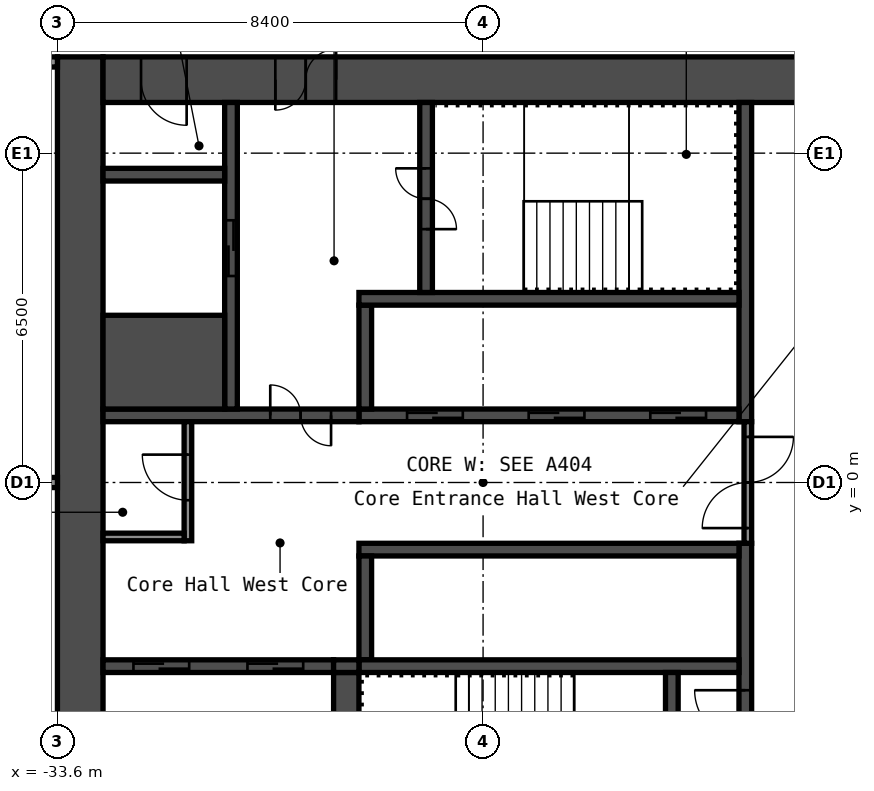
"""IFC4 building model, lengths in metres.
Left out: names, types, materials, properties, quantities, classifications, styles, units other than length and angle.
Written with IfcOpenShell. Run it as: python <this file> out.ifc"""

import sys

from ifc_helpers import new_model, si_unit, direction, frame, frame_2d, origin, place, context, subcontext, project, spatial, rectangle, extrude, element, fill, save


model = new_model("IFC4")
c1 = context("Model", 3, precision=1e-05, world=origin(), true_north=direction((0.0, 1.0)))
c2 = subcontext(c1, "Body", "Model", "MODEL_VIEW")
j1 = project(units=[si_unit("LENGTHUNIT", "METRE"), si_unit("PLANEANGLEUNIT", "RADIAN")], contexts=[c1])
p1 = place(None, origin())
s1 = spatial("IfcSite", under=j1, at=p1, CompositionType="ELEMENT")
p2 = place(p1, origin())
s2 = spatial("IfcBuilding", under=s1, at=p2, CompositionType="ELEMENT")
p3 = place(p2, frame((0.0, 0.0, 19.8)))
s3 = spatial("IfcBuildingStorey", under=s2, at=p3, CompositionType="ELEMENT", Elevation=19.8)
p4 = place(p3, frame((-33.15, -8.4, 0.0), z_axis=(0.0, 0.0, 1.0), x_axis=(0.0, 1.0, 0.0)))
e1 = element("IfcWall", 1, at=p4, inside=s3, PredefinedType="SHEAR", context=c2, shape_type="SweptSolid", body=[
    extrude(rectangle(XDim=16.8, YDim=0.9, at=frame_2d((8.4, 0.0))), origin(), (0.0, 0.0, 1.0), 2.8),
])
p5 = place(p3, frame((-32.7, 7.95, 0.0), z_axis=(0.0, 0.0, 1.0), x_axis=(1.0, 0.0, 0.0)))
e2 = element("IfcWall", 2, at=p5, inside=s3, PredefinedType="SHEAR", context=c2, shape_type="SweptSolid", body=[
    extrude(rectangle(XDim=15.0, YDim=0.9, at=frame_2d((7.5, 0.0))), origin(), (0.0, 0.0, 1.0), 2.8),
])
p6 = place(p5, frame((3.4, 0.0, 0.0)))
e3 = element("IfcOpeningElement", 3, at=p6, cuts=e2, PredefinedType="OPENING", context=c2, shape_type="SweptSolid", body=[
    extrude(rectangle(XDim=1.2, YDim=2.1, at=frame_2d((0.6, 1.05))), frame((0.0, 0.46, 0.0), z_axis=(0.0, -1.0, 0.0), x_axis=(1.0, 0.0, 0.0)), (0.0, 0.0, 1.0), 0.92),
])
p7 = place(p5, frame((0.75, 0.0, 0.0)))
e4 = element("IfcOpeningElement", 4, at=p7, cuts=e2, PredefinedType="OPENING", context=c2, shape_type="SweptSolid", body=[
    extrude(rectangle(XDim=0.9, YDim=2.1, at=frame_2d((0.45, 1.05))), frame((0.0, 0.46, 0.0), z_axis=(0.0, -1.0, 0.0), x_axis=(1.0, 0.0, 0.0)), (0.0, 0.0, 1.0), 0.92),
])
p8 = place(p3, frame((-20.025, 1.2, 0.0), z_axis=(0.0, 0.0, 1.0), x_axis=(0.0, 1.0, 0.0)))
e5 = element("IfcWall", 5, at=p8, inside=s3, PredefinedType="SHEAR", context=c2, shape_type="SweptSolid", body=[
    extrude(rectangle(XDim=6.3, YDim=0.25, at=frame_2d((3.15, 0.0))), origin(), (0.0, 0.0, 1.0), 2.8),
])
p9 = place(p3, frame((-20.025, -7.5, 0.0), z_axis=(0.0, 0.0, 1.0), x_axis=(0.0, 1.0, 0.0)))
e6 = element("IfcWall", 6, at=p9, inside=s3, PredefinedType="SHEAR", context=c2, shape_type="SweptSolid", body=[
    extrude(rectangle(XDim=6.3, YDim=0.25, at=frame_2d((3.15, 0.0))), origin(), (0.0, 0.0, 1.0), 2.8),
])
p10 = place(p9, frame((2.4, 0.0, 0.0)))
e7 = element("IfcOpeningElement", 7, at=p10, cuts=e6, PredefinedType="OPENING", context=c2, shape_type="SweptSolid", body=[
    extrude(rectangle(XDim=1.0, YDim=2.1, at=frame_2d((0.5, 1.05))), frame((0.0, 0.135, 0.0), z_axis=(0.0, -1.0, 0.0), x_axis=(1.0, 0.0, 0.0)), (0.0, 0.0, 1.0), 0.27),
])
p11 = place(p3, frame((-27.65, 1.325, 0.0), z_axis=(0.0, 0.0, 1.0), x_axis=(1.0, 0.0, 0.0)))
e8 = element("IfcWall", 8, at=p11, inside=s3, PredefinedType="SHEAR", context=c2, shape_type="SweptSolid", body=[
    extrude(rectangle(XDim=7.5, YDim=0.25, at=frame_2d((3.75, 0.0))), origin(), (0.0, 0.0, 1.0), 2.8),
])
p12 = place(p11, frame((5.75, 0.0, 0.0)))
e9 = element("IfcOpeningElement", 9, at=p12, cuts=e8, PredefinedType="OPENING", context=c2, shape_type="SweptSolid", body=[
    extrude(rectangle(XDim=1.1, YDim=2.1, at=frame_2d((0.55, 1.05))), frame((0.0, 0.135, 0.0), z_axis=(0.0, -1.0, 0.0), x_axis=(1.0, 0.0, 0.0)), (0.0, 0.0, 1.0), 0.27),
])
p13 = place(p11, frame((3.35, 0.0, 0.0)))
e10 = element("IfcOpeningElement", 10, at=p13, cuts=e8, PredefinedType="OPENING", context=c2, shape_type="SweptSolid", body=[
    extrude(rectangle(XDim=1.1, YDim=2.1, at=frame_2d((0.55, 1.05))), frame((0.0, 0.135, 0.0), z_axis=(0.0, -1.0, 0.0), x_axis=(1.0, 0.0, 0.0)), (0.0, 0.0, 1.0), 0.27),
])
p14 = place(p11, frame((0.95, 0.0, 0.0)))
e11 = element("IfcOpeningElement", 11, at=p14, cuts=e8, PredefinedType="OPENING", context=c2, shape_type="SweptSolid", body=[
    extrude(rectangle(XDim=1.1, YDim=2.1, at=frame_2d((0.55, 1.05))), frame((0.0, 0.135, 0.0), z_axis=(0.0, -1.0, 0.0), x_axis=(1.0, 0.0, 0.0)), (0.0, 0.0, 1.0), 0.27),
])
p15 = place(p3, frame((-27.525, 1.45, 0.0), z_axis=(0.0, 0.0, 1.0), x_axis=(0.0, 1.0, 0.0)))
e12 = element("IfcWall", 12, at=p15, inside=s3, PredefinedType="SHEAR", context=c2, shape_type="SweptSolid", body=[
    extrude(rectangle(XDim=2.05, YDim=0.25, at=frame_2d((1.025, 0.0))), origin(), (0.0, 0.0, 1.0), 2.8),
])
p16 = place(p3, frame((-27.65, 3.625, 0.0), z_axis=(0.0, 0.0, 1.0), x_axis=(1.0, 0.0, 0.0)))
e13 = element("IfcWall", 13, at=p16, inside=s3, PredefinedType="SHEAR", context=c2, shape_type="SweptSolid", body=[
    extrude(rectangle(XDim=7.5, YDim=0.25, at=frame_2d((3.75, 0.0))), origin(), (0.0, 0.0, 1.0), 2.8),
])
p17 = place(p3, frame((-26.325, 3.75, 0.0), z_axis=(0.0, 0.0, 1.0), x_axis=(0.0, 1.0, 0.0)))
e14 = element("IfcWall", 14, at=p17, inside=s3, PredefinedType="SHEAR", context=c2, shape_type="SweptSolid", body=[
    extrude(rectangle(XDim=3.75, YDim=0.25, at=frame_2d((1.875, 0.0))), origin(), (0.0, 0.0, 1.0), 2.8),
])
p18 = place(p17, frame((1.25, 0.0, 0.0)))
e15 = element("IfcOpeningElement", 15, at=p18, cuts=e14, PredefinedType="OPENING", context=c2, shape_type="SweptSolid", body=[
    extrude(rectangle(XDim=1.2, YDim=2.1, at=frame_2d((0.6, 1.05))), frame((0.0, 0.135, 0.0), z_axis=(0.0, -1.0, 0.0), x_axis=(1.0, 0.0, 0.0)), (0.0, 0.0, 1.0), 0.27),
])
p19 = place(p3, frame((-32.7, 1.325, 0.0), z_axis=(0.0, 0.0, 1.0), x_axis=(1.0, 0.0, 0.0)))
e16 = element("IfcWall", 16, at=p19, inside=s3, PredefinedType="SHEAR", context=c2, shape_type="SweptSolid", body=[
    extrude(rectangle(XDim=5.05, YDim=0.25, at=frame_2d((2.525, 0.0))), origin(), (0.0, 0.0, 1.0), 2.8),
])
p20 = place(p19, frame((3.3, 0.0, 0.0)))
e17 = element("IfcOpeningElement", 17, at=p20, cuts=e16, PredefinedType="OPENING", context=c2, shape_type="SweptSolid", body=[
    extrude(rectangle(XDim=1.2, YDim=2.1, at=frame_2d((0.6, 1.05))), frame((0.0, 0.135, 0.0), z_axis=(0.0, -1.0, 0.0), x_axis=(1.0, 0.0, 0.0)), (0.0, 0.0, 1.0), 0.27),
])
p21 = place(p3, frame((-30.175, 1.45, 0.0), z_axis=(0.0, 0.0, 1.0), x_axis=(0.0, 1.0, 0.0)))
e18 = element("IfcWall", 18, at=p21, inside=s3, PredefinedType="SHEAR", context=c2, shape_type="SweptSolid", body=[
    extrude(rectangle(XDim=6.05, YDim=0.25, at=frame_2d((3.025, 0.0))), origin(), (0.0, 0.0, 1.0), 2.8),
])
p22 = place(p21, frame((2.625, 0.0, 0.0)))
e19 = element("IfcOpeningElement", 19, at=p22, cuts=e18, PredefinedType="OPENING", context=c2, shape_type="SweptSolid", body=[
    extrude(rectangle(XDim=1.1, YDim=2.1, at=frame_2d((0.55, 1.05))), frame((0.0, 0.135, 0.0), z_axis=(0.0, -1.0, 0.0), x_axis=(1.0, 0.0, 0.0)), (0.0, 0.0, 1.0), 0.27),
])
p23 = place(p3, frame((-32.7, 2.375, 0.0), z_axis=(0.0, 0.0, 1.0), x_axis=(1.0, 0.0, 0.0)))
e20 = element("IfcWall", 20, at=p23, inside=s3, PredefinedType="SHEAR", context=c2, shape_type="SweptSolid", body=[
    extrude(rectangle(XDim=2.4, YDim=1.85, at=frame_2d((1.2, 0.0))), origin(), (0.0, 0.0, 1.0), 2.8),
])
p24 = place(p3, frame((-32.7, 6.075, 0.0), z_axis=(0.0, 0.0, 1.0), x_axis=(1.0, 0.0, 0.0)))
e21 = element("IfcWall", 21, at=p24, inside=s3, PredefinedType="SHEAR", context=c2, shape_type="SweptSolid", body=[
    extrude(rectangle(XDim=2.4, YDim=0.25, at=frame_2d((1.2, 0.0))), origin(), (0.0, 0.0, 1.0), 2.8),
])
p25 = place(p3, frame((-27.65, -1.325, 0.0), z_axis=(0.0, 0.0, 1.0), x_axis=(1.0, 0.0, 0.0)))
e22 = element("IfcWall", 22, at=p25, inside=s3, PredefinedType="SHEAR", context=c2, shape_type="SweptSolid", body=[
    extrude(rectangle(XDim=7.5, YDim=0.25, at=frame_2d((3.75, 0.0))), origin(), (0.0, 0.0, 1.0), 2.8),
])
p26 = place(p3, frame((-27.525, -3.5, 0.0), z_axis=(0.0, 0.0, 1.0), x_axis=(0.0, 1.0, 0.0)))
e23 = element("IfcWall", 23, at=p26, inside=s3, PredefinedType="SHEAR", context=c2, shape_type="SweptSolid", body=[
    extrude(rectangle(XDim=2.05, YDim=0.25, at=frame_2d((1.025, 0.0))), origin(), (0.0, 0.0, 1.0), 2.8),
])
p27 = place(p3, frame((-27.65, -3.625, 0.0), z_axis=(0.0, 0.0, 1.0), x_axis=(1.0, 0.0, 0.0)))
e24 = element("IfcWall", 24, at=p27, inside=s3, PredefinedType="SHEAR", context=c2, shape_type="SweptSolid", body=[
    extrude(rectangle(XDim=7.5, YDim=0.25, at=frame_2d((3.75, 0.0))), origin(), (0.0, 0.0, 1.0), 2.8),
])
p28 = place(p3, frame((-21.475, -7.5, 0.0), z_axis=(0.0, 0.0, 1.0), x_axis=(0.0, 1.0, 0.0)))
e25 = element("IfcWall", 25, at=p28, inside=s3, PredefinedType="SHEAR", context=c2, shape_type="SweptSolid", body=[
    extrude(rectangle(XDim=3.75, YDim=0.25, at=frame_2d((1.875, 0.0))), origin(), (0.0, 0.0, 1.0), 2.8),
])
p29 = place(p28, frame((1.3, 0.0, 0.0)))
e26 = element("IfcOpeningElement", 26, at=p29, cuts=e25, PredefinedType="OPENING", context=c2, shape_type="SweptSolid", body=[
    extrude(rectangle(XDim=1.2, YDim=2.1, at=frame_2d((0.6, 1.05))), frame((0.0, 0.135, 0.0), z_axis=(0.0, -1.0, 0.0), x_axis=(1.0, 0.0, 0.0)), (0.0, 0.0, 1.0), 0.27),
])
p30 = place(p3, frame((-27.9, -7.5, 0.0), z_axis=(0.0, 0.0, 1.0), x_axis=(0.0, 1.0, 0.0)))
e27 = element("IfcWall", 27, at=p30, inside=s3, PredefinedType="SHEAR", context=c2, shape_type="SweptSolid", body=[
    extrude(rectangle(XDim=3.75, YDim=0.5, at=frame_2d((1.875, 0.0))), origin(), (0.0, 0.0, 1.0), 2.8),
])
p31 = place(p3, frame((-32.7, -3.625, 0.0), z_axis=(0.0, 0.0, 1.0), x_axis=(1.0, 0.0, 0.0)))
e28 = element("IfcWall", 28, at=p31, inside=s3, PredefinedType="SHEAR", context=c2, shape_type="SweptSolid", body=[
    extrude(rectangle(XDim=4.55, YDim=0.25, at=frame_2d((2.275, 0.0))), origin(), (0.0, 0.0, 1.0), 2.8),
])
p32 = place(p31, frame((2.85, 0.0, 0.0)))
e29 = element("IfcOpeningElement", 29, at=p32, cuts=e28, PredefinedType="OPENING", context=c2, shape_type="SweptSolid", body=[
    extrude(rectangle(XDim=1.1, YDim=2.1, at=frame_2d((0.55, 1.05))), frame((0.0, 0.135, 0.0), z_axis=(0.0, -1.0, 0.0), x_axis=(1.0, 0.0, 0.0)), (0.0, 0.0, 1.0), 0.27),
])
p33 = place(p31, frame((0.6, 0.0, 0.0)))
e30 = element("IfcOpeningElement", 30, at=p33, cuts=e28, PredefinedType="OPENING", context=c2, shape_type="SweptSolid", body=[
    extrude(rectangle(XDim=1.1, YDim=2.1, at=frame_2d((0.55, 1.05))), frame((0.0, 0.135, 0.0), z_axis=(0.0, -1.0, 0.0), x_axis=(1.0, 0.0, 0.0)), (0.0, 0.0, 1.0), 0.27),
])
p34 = place(p3, frame((-28.15, -3.625, 0.0), z_axis=(0.0, 0.0, 1.0), x_axis=(1.0, 0.0, 0.0)))
e31 = element("IfcWall", 31, at=p34, inside=s3, PredefinedType="SHEAR", context=c2, shape_type="SweptSolid", body=[
    extrude(rectangle(XDim=0.5, YDim=0.25, at=frame_2d((0.25, 0.0))), origin(), (0.0, 0.0, 1.0), 2.8),
])
p35 = place(p3, frame((-19.975, -1.2, 0.0), z_axis=(0.0, 0.0, 1.0), x_axis=(0.0, 1.0, 0.0)))
e32 = element("IfcWall", 32, at=p35, inside=s3, PredefinedType="PARTITIONING", context=c2, shape_type="SweptSolid", body=[
    extrude(rectangle(XDim=2.4, YDim=0.15, at=frame_2d((1.2, 0.0))), origin(), (0.0, 0.0, 1.0), 2.8),
])
p36 = place(p35, frame((0.3, 0.0, 0.0)))
e33 = element("IfcOpeningElement", 33, at=p36, cuts=e32, PredefinedType="OPENING", context=c2, shape_type="SweptSolid", body=[
    extrude(rectangle(XDim=1.8, YDim=2.1, at=frame_2d((0.9, 1.05))), frame((0.0, 0.085, 0.0), z_axis=(0.0, -1.0, 0.0), x_axis=(1.0, 0.0, 0.0)), (0.0, 0.0, 1.0), 0.17),
])
p37 = place(p3, frame((-31.025, -1.15, 0.0), z_axis=(0.0, 0.0, 1.0), x_axis=(0.0, 1.0, 0.0)))
e34 = element("IfcWall", 34, at=p37, inside=s3, PredefinedType="PARTITIONING", context=c2, shape_type="SweptSolid", body=[
    extrude(rectangle(XDim=2.35, YDim=0.15, at=frame_2d((1.175, 0.0))), origin(), (0.0, 0.0, 1.0), 2.8),
])
p38 = place(p37, frame((0.8, 0.0, 0.0)))
e35 = element("IfcOpeningElement", 35, at=p38, cuts=e34, PredefinedType="OPENING", context=c2, shape_type="SweptSolid", body=[
    extrude(rectangle(XDim=0.9, YDim=2.1, at=frame_2d((0.45, 1.05))), frame((0.0, 0.085, 0.0), z_axis=(0.0, -1.0, 0.0), x_axis=(1.0, 0.0, 0.0)), (0.0, 0.0, 1.0), 0.17),
])
p39 = place(p3, frame((-32.7, -1.075, 0.0), z_axis=(0.0, 0.0, 1.0), x_axis=(1.0, 0.0, 0.0)))
e36 = element("IfcWall", 36, at=p39, inside=s3, PredefinedType="PARTITIONING", context=c2, shape_type="SweptSolid", body=[
    extrude(rectangle(XDim=1.6, YDim=0.15, at=frame_2d((0.8, 0.0))), origin(), (0.0, 0.0, 1.0), 2.8),
])
p40 = place(p3, frame((-48.5, 0.0, 0.0), z_axis=(0.0, 0.0, 1.0), x_axis=(1.0, 0.0, 0.0)))
e37 = element("IfcWall", 37, at=p40, inside=s3, PredefinedType="PARTITIONING", context=c2, shape_type="SweptSolid", body=[
    extrude(rectangle(XDim=14.9, YDim=0.2, at=frame_2d((7.45, 0.0))), origin(), (0.0, 0.0, 1.0), 2.8),
])
p41 = place(p3, frame((-48.6, 8.3, 0.0), z_axis=(0.0, 0.0, 1.0), x_axis=(1.0, 0.0, 0.0)))
e38 = element("IfcWall", 38, at=p41, inside=s3, PredefinedType="PARTITIONING", context=c2, shape_type="SweptSolid", body=[
    extrude(rectangle(XDim=15.0, YDim=0.2, at=frame_2d((7.5, 0.0))), origin(), (0.0, 0.0, 1.0), 2.8),
])
p42 = place(p41, frame((1.33, 0.0, 0.0)))
e39 = element("IfcOpeningElement", 39, at=p42, cuts=e38, PredefinedType="OPENING", context=c2, shape_type="SweptSolid", body=[
    extrude(rectangle(XDim=0.9, YDim=2.1, at=frame_2d((0.45, 1.05))), frame((0.0, 0.11, 0.0), z_axis=(0.0, -1.0, 0.0), x_axis=(1.0, 0.0, 0.0)), (0.0, 0.0, 1.0), 0.22),
])
p43 = place(p41, frame((4.63, 0.0, 0.0)))
e40 = element("IfcOpeningElement", 40, at=p43, cuts=e38, PredefinedType="OPENING", context=c2, shape_type="SweptSolid", body=[
    extrude(rectangle(XDim=0.9, YDim=2.1, at=frame_2d((0.45, 1.05))), frame((0.0, 0.11, 0.0), z_axis=(0.0, -1.0, 0.0), x_axis=(1.0, 0.0, 0.0)), (0.0, 0.0, 1.0), 0.22),
])
p44 = place(p41, frame((10.8, 0.0, 0.0)))
e41 = element("IfcOpeningElement", 41, at=p44, cuts=e38, PredefinedType="OPENING", context=c2, shape_type="SweptSolid", body=[
    extrude(rectangle(XDim=1.6, YDim=2.1, at=frame_2d((0.8, 1.05))), frame((0.0, 0.11, 0.0), z_axis=(0.0, -1.0, 0.0), x_axis=(1.0, 0.0, 0.0)), (0.0, 0.0, 1.0), 0.22),
])
p45 = place(p6, origin())
e42 = element("IfcDoor", 42, at=p45, inside=s3, OperationType="DOUBLE_DOOR_SINGLE_SWING", PredefinedType="DOOR", context=c2, shape_type="SweptSolid", body=[
    extrude(rectangle(XDim=1.2, YDim=2.1, at=frame_2d((0.6, 1.05))), frame((0.0, 0.025, 0.0), z_axis=(0.0, -1.0, 0.0), x_axis=(1.0, 0.0, 0.0)), (0.0, 0.0, 1.0), 0.05),
])
fill(e3, e42)
p46 = place(p7, origin())
e43 = element("IfcDoor", 43, at=p46, inside=s3, OperationType="SINGLE_SWING_RIGHT", PredefinedType="DOOR", context=c2, shape_type="SweptSolid", body=[
    extrude(rectangle(XDim=0.9, YDim=2.1, at=frame_2d((0.45, 1.05))), frame((0.0, 0.025, 0.0), z_axis=(0.0, -1.0, 0.0), x_axis=(1.0, 0.0, 0.0)), (0.0, 0.0, 1.0), 0.05),
])
fill(e4, e43)
p47 = place(p18, origin())
e44 = element("IfcDoor", 44, at=p47, inside=s3, OperationType="DOUBLE_DOOR_SINGLE_SWING", PredefinedType="DOOR", context=c2, shape_type="SweptSolid", body=[
    extrude(rectangle(XDim=1.2, YDim=2.1, at=frame_2d((0.6, 1.05))), frame((0.0, 0.025, 0.0), z_axis=(0.0, -1.0, 0.0), x_axis=(1.0, 0.0, 0.0)), (0.0, 0.0, 1.0), 0.05),
])
fill(e15, e44)
p48 = place(p10, origin())
e45 = element("IfcDoor", 45, at=p48, inside=s3, OperationType="SINGLE_SWING_LEFT", PredefinedType="DOOR", context=c2, shape_type="SweptSolid", body=[
    extrude(rectangle(XDim=1.0, YDim=2.1, at=frame_2d((0.5, 1.05))), frame((0.0, 0.025, 0.0), z_axis=(0.0, -1.0, 0.0), x_axis=(1.0, 0.0, 0.0)), (0.0, 0.0, 1.0), 0.05),
])
fill(e7, e45)
p49 = place(p20, origin())
e46 = element("IfcDoor", 46, at=p49, inside=s3, OperationType="DOUBLE_DOOR_SINGLE_SWING", PredefinedType="DOOR", context=c2, shape_type="SweptSolid", body=[
    extrude(rectangle(XDim=1.2, YDim=2.1, at=frame_2d((0.6, 1.05))), frame((0.0, 0.025, 0.0), z_axis=(0.0, -1.0, 0.0), x_axis=(1.0, 0.0, 0.0)), (0.0, 0.0, 1.0), 0.05),
])
fill(e17, e46)
p50 = place(p36, origin())
e47 = element("IfcDoor", 47, at=p50, inside=s3, OperationType="DOUBLE_DOOR_SINGLE_SWING", PredefinedType="DOOR", context=c2, shape_type="SweptSolid", body=[
    extrude(rectangle(XDim=1.8, YDim=2.1, at=frame_2d((0.9, 1.05))), frame((0.0, 0.025, 0.0), z_axis=(0.0, -1.0, 0.0), x_axis=(1.0, 0.0, 0.0)), (0.0, 0.0, 1.0), 0.05),
])
fill(e33, e47)
p51 = place(p38, origin())
e48 = element("IfcDoor", 48, at=p51, inside=s3, OperationType="SINGLE_SWING_LEFT", PredefinedType="DOOR", context=c2, shape_type="SweptSolid", body=[
    extrude(rectangle(XDim=0.9, YDim=2.1, at=frame_2d((0.45, 1.05))), frame((0.0, 0.025, 0.0), z_axis=(0.0, -1.0, 0.0), x_axis=(1.0, 0.0, 0.0)), (0.0, 0.0, 1.0), 0.05),
])
fill(e35, e48)
p52 = place(p12, origin())
e49 = element("IfcDoor", 49, at=p52, inside=s3, OperationType="DOUBLE_DOOR_SLIDING", PredefinedType="DOOR", context=c2, shape_type="SweptSolid", body=[
    extrude(rectangle(XDim=1.1, YDim=2.1, at=frame_2d((0.55, 1.05))), frame((0.0, 0.025, 0.0), z_axis=(0.0, -1.0, 0.0), x_axis=(1.0, 0.0, 0.0)), (0.0, 0.0, 1.0), 0.05),
])
fill(e9, e49)
p53 = place(p13, origin())
e50 = element("IfcDoor", 50, at=p53, inside=s3, OperationType="DOUBLE_DOOR_SLIDING", PredefinedType="DOOR", context=c2, shape_type="SweptSolid", body=[
    extrude(rectangle(XDim=1.1, YDim=2.1, at=frame_2d((0.55, 1.05))), frame((0.0, 0.025, 0.0), z_axis=(0.0, -1.0, 0.0), x_axis=(1.0, 0.0, 0.0)), (0.0, 0.0, 1.0), 0.05),
])
fill(e10, e50)
p54 = place(p14, origin())
e51 = element("IfcDoor", 51, at=p54, inside=s3, OperationType="DOUBLE_DOOR_SLIDING", PredefinedType="DOOR", context=c2, shape_type="SweptSolid", body=[
    extrude(rectangle(XDim=1.1, YDim=2.1, at=frame_2d((0.55, 1.05))), frame((0.0, 0.025, 0.0), z_axis=(0.0, -1.0, 0.0), x_axis=(1.0, 0.0, 0.0)), (0.0, 0.0, 1.0), 0.05),
])
fill(e11, e51)
p55 = place(p22, origin())
e52 = element("IfcDoor", 52, at=p55, inside=s3, OperationType="DOUBLE_DOOR_SLIDING", PredefinedType="DOOR", context=c2, shape_type="SweptSolid", body=[
    extrude(rectangle(XDim=1.1, YDim=2.1, at=frame_2d((0.55, 1.05))), frame((0.0, 0.025, 0.0), z_axis=(0.0, -1.0, 0.0), x_axis=(1.0, 0.0, 0.0)), (0.0, 0.0, 1.0), 0.05),
])
fill(e19, e52)
p56 = place(p32, origin())
e53 = element("IfcDoor", 53, at=p56, inside=s3, OperationType="DOUBLE_DOOR_SLIDING", PredefinedType="DOOR", context=c2, shape_type="SweptSolid", body=[
    extrude(rectangle(XDim=1.1, YDim=2.1, at=frame_2d((0.55, 1.05))), frame((0.0, 0.025, 0.0), z_axis=(0.0, -1.0, 0.0), x_axis=(1.0, 0.0, 0.0)), (0.0, 0.0, 1.0), 0.05),
])
fill(e29, e53)
p57 = place(p33, origin())
e54 = element("IfcDoor", 54, at=p57, inside=s3, OperationType="DOUBLE_DOOR_SLIDING", PredefinedType="DOOR", context=c2, shape_type="SweptSolid", body=[
    extrude(rectangle(XDim=1.1, YDim=2.1, at=frame_2d((0.55, 1.05))), frame((0.0, 0.025, 0.0), z_axis=(0.0, -1.0, 0.0), x_axis=(1.0, 0.0, 0.0)), (0.0, 0.0, 1.0), 0.05),
])
fill(e30, e54)
save(model, sys.argv[1])
